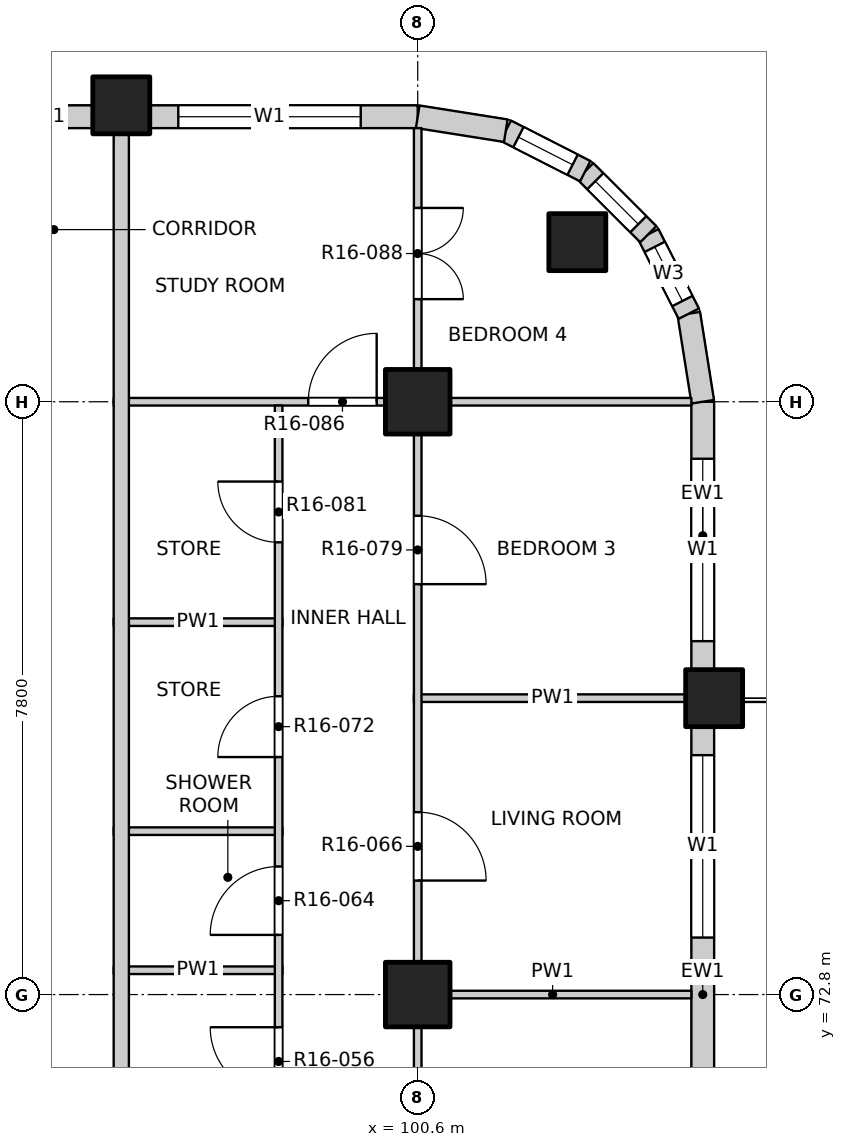
"""IFC4 building model, lengths in metres.
Left out: names, types, materials, properties, quantities, classifications, styles, units other than length and angle.
Written with IfcOpenShell. Run it as: python <this file> out.ifc"""

import sys

from ifc_helpers import new_model, si_unit, direction, frame, frame_2d, origin, origin_2d, place, context, subcontext, project, spatial, rectangle, extrude, element, fill, save


model = new_model("IFC4")
c1 = context("Model", 3, precision=1e-05, world=origin(), true_north=direction((0.0, 1.0)))
c2 = subcontext(c1, "Body", "Model", "MODEL_VIEW")
j1 = project(units=[si_unit("LENGTHUNIT", "METRE"), si_unit("PLANEANGLEUNIT", "RADIAN")], contexts=[c1])
p1 = place(None, origin())
s1 = spatial("IfcSite", under=j1, at=p1, CompositionType="ELEMENT")
p2 = place(p1, origin())
s2 = spatial("IfcBuilding", under=s1, at=p2, CompositionType="ELEMENT")
p3 = place(p2, frame((0.0, 0.0, 169.0)))
s3 = spatial("IfcBuildingStorey", under=s2, at=p3, CompositionType="ELEMENT", Elevation=169.0)
for number, where, z_axis, x_axis in (
    (1, (102.7, 82.7, -0.25), (0.0, 0.0, 1.0), (1.0, 0.0, 0.0)),
    (2, (104.5, 76.7, -0.25), (0.0, 0.0, 1.0), (1.0, 0.0, 0.0)),
    (3, (96.7, 84.5, -0.25), (0.0, 0.0, 1.0), (1.0, 0.0, 0.0)),
):
    element("IfcColumn", number, at=place(p3, frame(where, z_axis=z_axis, x_axis=x_axis)), inside=s3, PredefinedType="COLUMN", context=c2, shape_type="SweptSolid", body=[
        extrude(rectangle(XDim=0.75, YDim=0.75, at=origin_2d()), origin(), (0.0, 0.0, 1.0), 3.35),
    ])
for number, where, z_axis, x_axis in (
    (4, (100.6, 72.8, -0.25), (0.0, 0.0, 1.0), (1.0, 0.0, 0.0)),
    (5, (100.6, 80.6, -0.25), (0.0, 0.0, 1.0), (1.0, 0.0, 0.0)),
):
    element("IfcColumn", number, at=place(p3, frame(where, z_axis=z_axis, x_axis=x_axis)), inside=s3, PredefinedType="COLUMN", context=c2, shape_type="SweptSolid", body=[
        extrude(rectangle(XDim=0.85, YDim=0.85, at=origin_2d()), origin(), (0.0, 0.0, 1.0), 3.35),
    ])
p4 = place(p3, frame((104.35, 69.275, 0.0), z_axis=(0.0, 0.0, 1.0), x_axis=(0.0, 1.0, 0.0)))
e6 = element("IfcWall", 6, at=p4, inside=s3, PredefinedType="SOLIDWALL", context=c2, shape_type="SweptSolid", body=[
    extrude(rectangle(XDim=7.05, YDim=0.3, at=frame_2d((3.525, 0.0))), origin(), (0.0, 0.0, 1.0), 3.1),
])
p5 = place(p4, frame((0.675, 0.0, 0.0)))
e7 = element("IfcOpeningElement", 7, at=p5, cuts=e6, PredefinedType="OPENING", context=c2, shape_type="SweptSolid", body=[
    extrude(rectangle(XDim=1.8, YDim=2.4, at=frame_2d((0.9, 1.2))), frame((0.0, 0.16, 0.0), z_axis=(0.0, -1.0, 0.0), x_axis=(1.0, 0.0, 0.0)), (0.0, 0.0, 1.0), 0.32),
])
p6 = place(p4, frame((4.275, 0.0, 0.9)))
e8 = element("IfcOpeningElement", 8, at=p6, cuts=e6, PredefinedType="OPENING", context=c2, shape_type="SweptSolid", body=[
    extrude(rectangle(XDim=2.4, YDim=1.8, at=frame_2d((1.2, 0.9))), frame((0.0, 0.16, 0.0), z_axis=(0.0, -1.0, 0.0), x_axis=(1.0, 0.0, 0.0)), (0.0, 0.0, 1.0), 0.32),
])
p7 = place(p3, frame((104.35, 77.075, 0.0), z_axis=(0.0, 0.0, 1.0), x_axis=(0.0, 1.0, 0.0)))
e9 = element("IfcWall", 9, at=p7, inside=s3, PredefinedType="SOLIDWALL", context=c2, shape_type="SweptSolid", body=[
    extrude(rectangle(XDim=3.525, YDim=0.3, at=frame_2d((1.763, 0.0))), origin(), (0.0, 0.0, 1.0), 3.1),
])
p8 = place(p7, frame((0.375, 0.0, 0.9)))
e10 = element("IfcOpeningElement", 10, at=p8, cuts=e9, PredefinedType="OPENING", context=c2, shape_type="SweptSolid", body=[
    extrude(rectangle(XDim=2.4, YDim=1.8, at=frame_2d((1.2, 0.9))), frame((0.0, 0.16, 0.0), z_axis=(0.0, -1.0, 0.0), x_axis=(1.0, 0.0, 0.0)), (0.0, 0.0, 1.0), 0.32),
])
p9 = place(p3, frame((95.025, 84.35, 0.0), z_axis=(0.0, 0.0, 1.0), x_axis=(1.0, 0.0, 0.0)))
e11 = element("IfcWall", 11, at=p9, inside=s3, PredefinedType="SOLIDWALL", context=c2, shape_type="SweptSolid", body=[
    extrude(rectangle(XDim=1.3, YDim=0.3, at=frame_2d((0.65, 0.0))), origin(), (0.0, 0.0, 1.0), 3.1),
])
p10 = place(p3, frame((97.075, 84.35, 0.0), z_axis=(0.0, 0.0, 1.0), x_axis=(1.0, 0.0, 0.0)))
e12 = element("IfcWall", 12, at=p10, inside=s3, PredefinedType="SOLIDWALL", context=c2, shape_type="SweptSolid", body=[
    extrude(rectangle(XDim=3.525, YDim=0.3, at=frame_2d((1.763, 0.0))), origin(), (0.0, 0.0, 1.0), 3.1),
])
p11 = place(p10, frame((0.375, 0.0, 0.9)))
e13 = element("IfcOpeningElement", 13, at=p11, cuts=e12, PredefinedType="OPENING", context=c2, shape_type="SweptSolid", body=[
    extrude(rectangle(XDim=2.4, YDim=1.8, at=frame_2d((1.2, 0.9))), frame((0.0, 0.16, 0.0), z_axis=(0.0, -1.0, 0.0), x_axis=(1.0, 0.0, 0.0)), (0.0, 0.0, 1.0), 0.32),
])
p12 = place(p3, frame((104.35, 80.6, 0.0), z_axis=(0.0, 0.0, 1.0), x_axis=(-0.156496880861, 0.987678452879, 0.0)))
e14 = element("IfcWall", 14, at=p12, inside=s3, PredefinedType="SOLIDWALL", context=c2, shape_type="SweptSolid", body=[
    extrude(rectangle(XDim=1.173, YDim=0.3, at=frame_2d((0.586, 0.0))), origin(), (0.0, 0.0, 1.0), 3.1),
])
p13 = place(p3, frame((104.167, 81.759, 0.0), z_axis=(0.0, 0.0, 1.0), x_axis=(-0.454025524128, 0.890988677504, 0.0)))
e15 = element("IfcWall", 15, at=p13, inside=s3, PredefinedType="SOLIDWALL", context=c2, shape_type="SweptSolid", body=[
    extrude(rectangle(XDim=1.173, YDim=0.3, at=frame_2d((0.587, 0.0))), origin(), (0.0, 0.0, 1.0), 3.1),
])
p14 = place(p13, frame((0.187, 0.0, 0.9)))
e16 = element("IfcOpeningElement", 16, at=p14, cuts=e15, PredefinedType="OPENING", context=c2, shape_type="SweptSolid", body=[
    extrude(rectangle(XDim=0.8, YDim=1.2, at=frame_2d((0.4, 0.6))), frame((0.0, 0.16, 0.0), z_axis=(0.0, -1.0, 0.0), x_axis=(1.0, 0.0, 0.0)), (0.0, 0.0, 1.0), 0.32),
])
p15 = place(p3, frame((103.634, 82.804, 0.0), z_axis=(0.0, 0.0, 1.0), x_axis=(-0.707106781187, 0.707106781187, 0.0)))
e17 = element("IfcWall", 17, at=p15, inside=s3, PredefinedType="SOLIDWALL", context=c2, shape_type="SweptSolid", body=[
    extrude(rectangle(XDim=1.173, YDim=0.3, at=frame_2d((0.586, 0.0))), origin(), (0.0, 0.0, 1.0), 3.1),
])
p16 = place(p15, frame((0.187, 0.0, 0.9)))
e18 = element("IfcOpeningElement", 18, at=p16, cuts=e17, PredefinedType="OPENING", context=c2, shape_type="SweptSolid", body=[
    extrude(rectangle(XDim=0.8, YDim=1.2, at=frame_2d((0.4, 0.6))), frame((0.0, 0.16, 0.0), z_axis=(0.0, -1.0, 0.0), x_axis=(1.0, 0.0, 0.0)), (0.0, 0.0, 1.0), 0.32),
])
p17 = place(p3, frame((102.804, 83.634, 0.0), z_axis=(0.0, 0.0, 1.0), x_axis=(-0.890988677504, 0.454025524128, 0.0)))
e19 = element("IfcWall", 19, at=p17, inside=s3, PredefinedType="SOLIDWALL", context=c2, shape_type="SweptSolid", body=[
    extrude(rectangle(XDim=1.173, YDim=0.3, at=frame_2d((0.587, 0.0))), origin(), (0.0, 0.0, 1.0), 3.1),
])
p18 = place(p17, frame((0.187, 0.0, 0.9)))
e20 = element("IfcOpeningElement", 20, at=p18, cuts=e19, PredefinedType="OPENING", context=c2, shape_type="SweptSolid", body=[
    extrude(rectangle(XDim=0.8, YDim=1.2, at=frame_2d((0.4, 0.6))), frame((0.0, 0.16, 0.0), z_axis=(0.0, -1.0, 0.0), x_axis=(1.0, 0.0, 0.0)), (0.0, 0.0, 1.0), 0.32),
])
p19 = place(p3, frame((101.759, 84.167, 0.0), z_axis=(0.0, 0.0, 1.0), x_axis=(-0.987678452879, 0.156496880861, 0.0)))
e21 = element("IfcWall", 21, at=p19, inside=s3, PredefinedType="SOLIDWALL", context=c2, shape_type="SweptSolid", body=[
    extrude(rectangle(XDim=1.173, YDim=0.3, at=frame_2d((0.586, 0.0))), origin(), (0.0, 0.0, 1.0), 3.1),
])
p20 = place(p3, frame((100.55, 72.8, 0.0), z_axis=(0.0, 0.0, 1.0), x_axis=(1.0, 0.0, 0.0)))
e22 = element("IfcWall", 22, at=p20, inside=s3, PredefinedType="PARTITIONING", context=c2, shape_type="SweptSolid", body=[
    extrude(rectangle(XDim=3.65, YDim=0.1, at=frame_2d((1.825, 0.0))), origin(), (0.0, 0.0, 1.0), 3.1),
])
for number, where, z_axis, x_axis in (
    (23, (96.6, 73.12, 0.0), (0.0, 0.0, 1.0), (1.0, 0.0, 0.0)),
    (24, (96.6, 74.95, 0.0), (0.0, 0.0, 1.0), (1.0, 0.0, 0.0)),
):
    element("IfcWall", number, at=place(p3, frame(where, z_axis=z_axis, x_axis=x_axis)), inside=s3, PredefinedType="PARTITIONING", context=c2, shape_type="SweptSolid", body=[
        extrude(rectangle(XDim=2.22, YDim=0.1, at=frame_2d((1.11, 0.0))), origin(), (0.0, 0.0, 1.0), 3.1),
    ])
p21 = place(p3, frame((100.55, 76.7, 0.0), z_axis=(0.0, 0.0, 1.0), x_axis=(1.0, 0.0, 0.0)))
e25 = element("IfcWall", 25, at=p21, inside=s3, PredefinedType="PARTITIONING", context=c2, shape_type="SweptSolid", body=[
    extrude(rectangle(XDim=3.65, YDim=0.1, at=frame_2d((1.825, 0.0))), origin(), (0.0, 0.0, 1.0), 3.1),
])
p22 = place(p3, frame((96.6, 77.7, 0.0), z_axis=(0.0, 0.0, 1.0), x_axis=(1.0, 0.0, 0.0)))
e26 = element("IfcWall", 26, at=p22, inside=s3, PredefinedType="PARTITIONING", context=c2, shape_type="SweptSolid", body=[
    extrude(rectangle(XDim=2.22, YDim=0.1, at=frame_2d((1.11, 0.0))), origin(), (0.0, 0.0, 1.0), 3.1),
])
p23 = place(p3, frame((96.6, 80.6, 0.0), z_axis=(0.0, 0.0, 1.0), x_axis=(1.0, 0.0, 0.0)))
e27 = element("IfcWall", 27, at=p23, inside=s3, PredefinedType="PARTITIONING", context=c2, shape_type="SweptSolid", body=[
    extrude(rectangle(XDim=7.6, YDim=0.1, at=frame_2d((3.8, 0.0))), origin(), (0.0, 0.0, 1.0), 3.1),
])
p24 = place(p23, frame((2.56, 0.0, 0.0)))
e28 = element("IfcOpeningElement", 28, at=p24, cuts=e27, PredefinedType="OPENING", context=c2, shape_type="SweptSolid", body=[
    extrude(rectangle(XDim=0.9, YDim=2.1, at=frame_2d((0.45, 1.05))), frame((0.0, 0.06, 0.0), z_axis=(0.0, -1.0, 0.0), x_axis=(1.0, 0.0, 0.0)), (0.0, 0.0, 1.0), 0.12),
])
p25 = place(p3, frame((96.7, 49.5, 0.0), z_axis=(0.0, 0.0, 1.0), x_axis=(0.0, 1.0, 0.0)))
e29 = element("IfcWall", 29, at=p25, inside=s3, PredefinedType="PARTITIONING", context=c2, shape_type="SweptSolid", body=[
    extrude(rectangle(XDim=34.7, YDim=0.2, at=frame_2d((17.35, 0.0))), origin(), (0.0, 0.0, 1.0), 3.1),
])
p26 = place(p25, frame((6.875, 0.0, 0.0)))
e30 = element("IfcOpeningElement", 30, at=p26, cuts=e29, PredefinedType="OPENING", context=c2, shape_type="SweptSolid", body=[
    extrude(rectangle(XDim=1.0, YDim=2.1, at=frame_2d((0.5, 1.05))), frame((0.0, 0.11, 0.0), z_axis=(0.0, -1.0, 0.0), x_axis=(1.0, 0.0, 0.0)), (0.0, 0.0, 1.0), 0.22),
])
p27 = place(p25, frame((18.025, 0.0, 0.0)))
e31 = element("IfcOpeningElement", 31, at=p27, cuts=e29, PredefinedType="OPENING", context=c2, shape_type="SweptSolid", body=[
    extrude(rectangle(XDim=1.0, YDim=2.1, at=frame_2d((0.5, 1.05))), frame((0.0, 0.11, 0.0), z_axis=(0.0, -1.0, 0.0), x_axis=(1.0, 0.0, 0.0)), (0.0, 0.0, 1.0), 0.22),
])
p28 = place(p3, frame((98.77, 67.4, 0.0), z_axis=(0.0, 0.0, 1.0), x_axis=(0.0, 1.0, 0.0)))
e32 = element("IfcWall", 32, at=p28, inside=s3, PredefinedType="PARTITIONING", context=c2, shape_type="SweptSolid", body=[
    extrude(rectangle(XDim=13.15, YDim=0.1, at=frame_2d((6.575, 0.0))), origin(), (0.0, 0.0, 1.0), 3.1),
])
p29 = place(p28, frame((1.185, 0.0, 0.0)))
e33 = element("IfcOpeningElement", 33, at=p29, cuts=e32, PredefinedType="OPENING", context=c2, shape_type="SweptSolid", body=[
    extrude(rectangle(XDim=0.9, YDim=2.1, at=frame_2d((0.45, 1.05))), frame((0.0, 0.06, 0.0), z_axis=(0.0, -1.0, 0.0), x_axis=(1.0, 0.0, 0.0)), (0.0, 0.0, 1.0), 0.12),
])
p30 = place(p28, frame((4.07, 0.0, 0.0)))
e34 = element("IfcOpeningElement", 34, at=p30, cuts=e32, PredefinedType="OPENING", context=c2, shape_type="SweptSolid", body=[
    extrude(rectangle(XDim=0.9, YDim=2.1, at=frame_2d((0.45, 1.05))), frame((0.0, 0.06, 0.0), z_axis=(0.0, -1.0, 0.0), x_axis=(1.0, 0.0, 0.0)), (0.0, 0.0, 1.0), 0.12),
])
p31 = place(p28, frame((6.185, 0.0, 0.0)))
e35 = element("IfcOpeningElement", 35, at=p31, cuts=e32, PredefinedType="OPENING", context=c2, shape_type="SweptSolid", body=[
    extrude(rectangle(XDim=0.9, YDim=2.1, at=frame_2d((0.45, 1.05))), frame((0.0, 0.06, 0.0), z_axis=(0.0, -1.0, 0.0), x_axis=(1.0, 0.0, 0.0)), (0.0, 0.0, 1.0), 0.12),
])
p32 = place(p28, frame((8.525, 0.0, 0.0)))
e36 = element("IfcOpeningElement", 36, at=p32, cuts=e32, PredefinedType="OPENING", context=c2, shape_type="SweptSolid", body=[
    extrude(rectangle(XDim=0.8, YDim=2.1, at=frame_2d((0.4, 1.05))), frame((0.0, 0.06, 0.0), z_axis=(0.0, -1.0, 0.0), x_axis=(1.0, 0.0, 0.0)), (0.0, 0.0, 1.0), 0.12),
])
p33 = place(p28, frame((11.35, 0.0, 0.0)))
e37 = element("IfcOpeningElement", 37, at=p33, cuts=e32, PredefinedType="OPENING", context=c2, shape_type="SweptSolid", body=[
    extrude(rectangle(XDim=0.8, YDim=2.1, at=frame_2d((0.4, 1.05))), frame((0.0, 0.06, 0.0), z_axis=(0.0, -1.0, 0.0), x_axis=(1.0, 0.0, 0.0)), (0.0, 0.0, 1.0), 0.12),
])
p34 = place(p3, frame((100.6, 45.8, 0.0), z_axis=(0.0, 0.0, 1.0), x_axis=(0.0, 1.0, 0.0)))
e38 = element("IfcWall", 38, at=p34, inside=s3, PredefinedType="PARTITIONING", context=c2, shape_type="SweptSolid", body=[
    extrude(rectangle(XDim=38.4, YDim=0.1, at=frame_2d((19.2, 0.0))), origin(), (0.0, 0.0, 1.0), 3.1),
])
p35 = place(p34, frame((1.05, 0.0, 0.0)))
e39 = element("IfcOpeningElement", 39, at=p35, cuts=e38, PredefinedType="OPENING", context=c2, shape_type="SweptSolid", body=[
    extrude(rectangle(XDim=1.2, YDim=2.1, at=frame_2d((0.6, 1.05))), frame((0.0, 0.06, 0.0), z_axis=(0.0, -1.0, 0.0), x_axis=(1.0, 0.0, 0.0)), (0.0, 0.0, 1.0), 0.12),
])
p36 = place(p34, frame((6.9, 0.0, 0.0)))
e40 = element("IfcOpeningElement", 40, at=p36, cuts=e38, PredefinedType="OPENING", context=c2, shape_type="SweptSolid", body=[
    extrude(rectangle(XDim=1.2, YDim=2.1, at=frame_2d((0.6, 1.05))), frame((0.0, 0.06, 0.0), z_axis=(0.0, -1.0, 0.0), x_axis=(1.0, 0.0, 0.0)), (0.0, 0.0, 1.0), 0.12),
])
p37 = place(p34, frame((12.9, 0.0, 0.0)))
e41 = element("IfcOpeningElement", 41, at=p37, cuts=e38, PredefinedType="OPENING", context=c2, shape_type="SweptSolid", body=[
    extrude(rectangle(XDim=0.9, YDim=2.1, at=frame_2d((0.45, 1.05))), frame((0.0, 0.06, 0.0), z_axis=(0.0, -1.0, 0.0), x_axis=(1.0, 0.0, 0.0)), (0.0, 0.0, 1.0), 0.12),
])
p38 = place(p34, frame((16.8, 0.0, 0.0)))
e42 = element("IfcOpeningElement", 42, at=p38, cuts=e38, PredefinedType="OPENING", context=c2, shape_type="SweptSolid", body=[
    extrude(rectangle(XDim=0.9, YDim=2.1, at=frame_2d((0.45, 1.05))), frame((0.0, 0.06, 0.0), z_axis=(0.0, -1.0, 0.0), x_axis=(1.0, 0.0, 0.0)), (0.0, 0.0, 1.0), 0.12),
])
p39 = place(p34, frame((20.7, 0.0, 0.0)))
e43 = element("IfcOpeningElement", 43, at=p39, cuts=e38, PredefinedType="OPENING", context=c2, shape_type="SweptSolid", body=[
    extrude(rectangle(XDim=0.9, YDim=2.1, at=frame_2d((0.45, 1.05))), frame((0.0, 0.06, 0.0), z_axis=(0.0, -1.0, 0.0), x_axis=(1.0, 0.0, 0.0)), (0.0, 0.0, 1.0), 0.12),
])
p40 = place(p34, frame((24.6, 0.0, 0.0)))
e44 = element("IfcOpeningElement", 44, at=p40, cuts=e38, PredefinedType="OPENING", context=c2, shape_type="SweptSolid", body=[
    extrude(rectangle(XDim=0.9, YDim=2.1, at=frame_2d((0.45, 1.05))), frame((0.0, 0.06, 0.0), z_axis=(0.0, -1.0, 0.0), x_axis=(1.0, 0.0, 0.0)), (0.0, 0.0, 1.0), 0.12),
])
p41 = place(p34, frame((28.5, 0.0, 0.0)))
e45 = element("IfcOpeningElement", 45, at=p41, cuts=e38, PredefinedType="OPENING", context=c2, shape_type="SweptSolid", body=[
    extrude(rectangle(XDim=0.9, YDim=2.1, at=frame_2d((0.45, 1.05))), frame((0.0, 0.06, 0.0), z_axis=(0.0, -1.0, 0.0), x_axis=(1.0, 0.0, 0.0)), (0.0, 0.0, 1.0), 0.12),
])
p42 = place(p34, frame((32.4, 0.0, 0.0)))
e46 = element("IfcOpeningElement", 46, at=p42, cuts=e38, PredefinedType="OPENING", context=c2, shape_type="SweptSolid", body=[
    extrude(rectangle(XDim=0.9, YDim=2.1, at=frame_2d((0.45, 1.05))), frame((0.0, 0.06, 0.0), z_axis=(0.0, -1.0, 0.0), x_axis=(1.0, 0.0, 0.0)), (0.0, 0.0, 1.0), 0.12),
])
p43 = place(p34, frame((36.15, 0.0, 0.0)))
e47 = element("IfcOpeningElement", 47, at=p43, cuts=e38, PredefinedType="OPENING", context=c2, shape_type="SweptSolid", body=[
    extrude(rectangle(XDim=1.2, YDim=2.1, at=frame_2d((0.6, 1.05))), frame((0.0, 0.06, 0.0), z_axis=(0.0, -1.0, 0.0), x_axis=(1.0, 0.0, 0.0)), (0.0, 0.0, 1.0), 0.12),
])
p44 = place(p6, origin())
e48 = element("IfcWindow", 48, at=p44, inside=s3, PartitioningType="DOUBLE_PANEL_VERTICAL", PredefinedType="WINDOW", context=c2, shape_type="SweptSolid", body=[
    extrude(rectangle(XDim=2.4, YDim=1.8, at=frame_2d((1.2, 0.9))), frame((0.0, 0.03, 0.0), z_axis=(0.0, -1.0, 0.0), x_axis=(1.0, 0.0, 0.0)), (0.0, 0.0, 1.0), 0.06),
])
fill(e8, e48)
p45 = place(p8, origin())
e49 = element("IfcWindow", 49, at=p45, inside=s3, PartitioningType="DOUBLE_PANEL_VERTICAL", PredefinedType="WINDOW", context=c2, shape_type="SweptSolid", body=[
    extrude(rectangle(XDim=2.4, YDim=1.8, at=frame_2d((1.2, 0.9))), frame((0.0, 0.03, 0.0), z_axis=(0.0, -1.0, 0.0), x_axis=(1.0, 0.0, 0.0)), (0.0, 0.0, 1.0), 0.06),
])
fill(e10, e49)
p46 = place(p11, origin())
e50 = element("IfcWindow", 50, at=p46, inside=s3, PartitioningType="DOUBLE_PANEL_VERTICAL", PredefinedType="WINDOW", context=c2, shape_type="SweptSolid", body=[
    extrude(rectangle(XDim=2.4, YDim=1.8, at=frame_2d((1.2, 0.9))), frame((0.0, 0.03, 0.0), z_axis=(0.0, -1.0, 0.0), x_axis=(1.0, 0.0, 0.0)), (0.0, 0.0, 1.0), 0.06),
])
fill(e13, e50)
p47 = place(p14, origin())
e51 = element("IfcWindow", 51, at=p47, inside=s3, PartitioningType="SINGLE_PANEL", PredefinedType="WINDOW", context=c2, shape_type="SweptSolid", body=[
    extrude(rectangle(XDim=0.8, YDim=1.2, at=frame_2d((0.4, 0.6))), frame((0.0, 0.03, 0.0), z_axis=(0.0, -1.0, 0.0), x_axis=(1.0, 0.0, 0.0)), (0.0, 0.0, 1.0), 0.06),
])
fill(e16, e51)
p48 = place(p16, origin())
e52 = element("IfcWindow", 52, at=p48, inside=s3, PartitioningType="SINGLE_PANEL", PredefinedType="WINDOW", context=c2, shape_type="SweptSolid", body=[
    extrude(rectangle(XDim=0.8, YDim=1.2, at=frame_2d((0.4, 0.6))), frame((0.0, 0.03, 0.0), z_axis=(0.0, -1.0, 0.0), x_axis=(1.0, 0.0, 0.0)), (0.0, 0.0, 1.0), 0.06),
])
fill(e18, e52)
p49 = place(p18, origin())
e53 = element("IfcWindow", 53, at=p49, inside=s3, PartitioningType="SINGLE_PANEL", PredefinedType="WINDOW", context=c2, shape_type="SweptSolid", body=[
    extrude(rectangle(XDim=0.8, YDim=1.2, at=frame_2d((0.4, 0.6))), frame((0.0, 0.03, 0.0), z_axis=(0.0, -1.0, 0.0), x_axis=(1.0, 0.0, 0.0)), (0.0, 0.0, 1.0), 0.06),
])
fill(e20, e53)
p50 = place(p30, origin())
e54 = element("IfcDoor", 54, at=p50, inside=s3, OperationType="SINGLE_SWING_RIGHT", PredefinedType="DOOR", context=c2, shape_type="SweptSolid", body=[
    extrude(rectangle(XDim=0.9, YDim=2.1, at=frame_2d((0.45, 1.05))), frame((0.0, 0.025, 0.0), z_axis=(0.0, -1.0, 0.0), x_axis=(1.0, 0.0, 0.0)), (0.0, 0.0, 1.0), 0.05),
])
fill(e34, e54)
p51 = place(p31, origin())
e55 = element("IfcDoor", 55, at=p51, inside=s3, OperationType="SINGLE_SWING_LEFT", PredefinedType="DOOR", context=c2, shape_type="SweptSolid", body=[
    extrude(rectangle(XDim=0.9, YDim=2.1, at=frame_2d((0.45, 1.05))), frame((0.0, 0.025, 0.0), z_axis=(0.0, -1.0, 0.0), x_axis=(1.0, 0.0, 0.0)), (0.0, 0.0, 1.0), 0.05),
])
fill(e35, e55)
p52 = place(p41, origin())
e56 = element("IfcDoor", 56, at=p52, inside=s3, OperationType="SINGLE_SWING_RIGHT", PredefinedType="DOOR", context=c2, shape_type="SweptSolid", body=[
    extrude(rectangle(XDim=0.9, YDim=2.1, at=frame_2d((0.45, 1.05))), frame((0.0, 0.025, 0.0), z_axis=(0.0, -1.0, 0.0), x_axis=(1.0, 0.0, 0.0)), (0.0, 0.0, 1.0), 0.05),
])
fill(e45, e56)
p53 = place(p32, origin())
e57 = element("IfcDoor", 57, at=p53, inside=s3, OperationType="SINGLE_SWING_LEFT", PredefinedType="DOOR", context=c2, shape_type="SweptSolid", body=[
    extrude(rectangle(XDim=0.8, YDim=2.1, at=frame_2d((0.4, 1.05))), frame((0.0, 0.025, 0.0), z_axis=(0.0, -1.0, 0.0), x_axis=(1.0, 0.0, 0.0)), (0.0, 0.0, 1.0), 0.05),
])
fill(e36, e57)
p54 = place(p42, origin())
e58 = element("IfcDoor", 58, at=p54, inside=s3, OperationType="SINGLE_SWING_RIGHT", PredefinedType="DOOR", context=c2, shape_type="SweptSolid", body=[
    extrude(rectangle(XDim=0.9, YDim=2.1, at=frame_2d((0.45, 1.05))), frame((0.0, 0.025, 0.0), z_axis=(0.0, -1.0, 0.0), x_axis=(1.0, 0.0, 0.0)), (0.0, 0.0, 1.0), 0.05),
])
fill(e46, e58)
p55 = place(p33, origin())
e59 = element("IfcDoor", 59, at=p55, inside=s3, OperationType="SINGLE_SWING_RIGHT", PredefinedType="DOOR", context=c2, shape_type="SweptSolid", body=[
    extrude(rectangle(XDim=0.8, YDim=2.1, at=frame_2d((0.4, 1.05))), frame((0.0, 0.025, 0.0), z_axis=(0.0, -1.0, 0.0), x_axis=(1.0, 0.0, 0.0)), (0.0, 0.0, 1.0), 0.05),
])
fill(e37, e59)
p56 = place(p24, origin())
e60 = element("IfcDoor", 60, at=p56, inside=s3, OperationType="SINGLE_SWING_RIGHT", PredefinedType="DOOR", context=c2, shape_type="SweptSolid", body=[
    extrude(rectangle(XDim=0.9, YDim=2.1, at=frame_2d((0.45, 1.05))), frame((0.0, 0.025, 0.0), z_axis=(0.0, -1.0, 0.0), x_axis=(1.0, 0.0, 0.0)), (0.0, 0.0, 1.0), 0.05),
])
fill(e28, e60)
p57 = place(p43, origin())
e61 = element("IfcDoor", 61, at=p57, inside=s3, OperationType="DOUBLE_DOOR_SINGLE_SWING", PredefinedType="DOOR", context=c2, shape_type="SweptSolid", body=[
    extrude(rectangle(XDim=1.2, YDim=2.1, at=frame_2d((0.6, 1.05))), frame((0.0, 0.025, 0.0), z_axis=(0.0, -1.0, 0.0), x_axis=(1.0, 0.0, 0.0)), (0.0, 0.0, 1.0), 0.05),
])
fill(e47, e61)
save(model, sys.argv[1])
